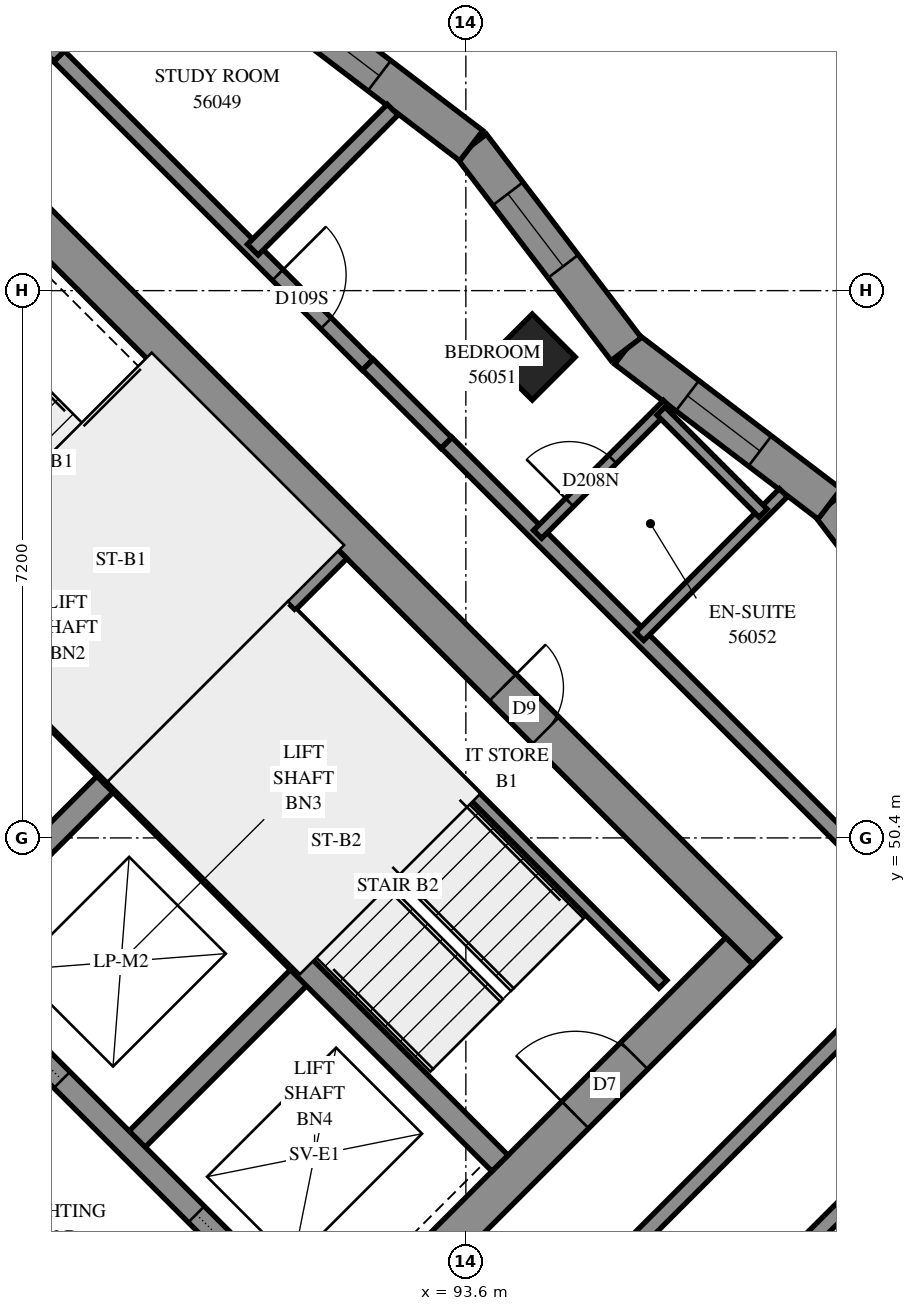
"""IFC4 building model, lengths in metres.
Left out: names, types, materials, properties, quantities, classifications, styles, units other than length and angle.
Written with IfcOpenShell. Run it as: python <this file> out.ifc"""

import sys

from ifc_helpers import new_model, si_unit, direction, frame, frame_2d, origin, origin_2d, place, context, subcontext, project, spatial, polyline, rectangle, outline, extrude, element, fill, save


model = new_model("IFC4")
c1 = context("Model", 3, precision=1e-05, world=origin(), true_north=direction((0.0, 1.0)))
c2 = subcontext(c1, "Body", "Model", "MODEL_VIEW")
j1 = project(units=[si_unit("LENGTHUNIT", "METRE"), si_unit("PLANEANGLEUNIT", "RADIAN")], contexts=[c1])
p1 = place(None, origin())
s1 = spatial("IfcSite", under=j1, at=p1, CompositionType="ELEMENT")
p2 = place(p1, origin())
s2 = spatial("IfcBuilding", under=s1, at=p2, CompositionType="ELEMENT")
p3 = place(p2, frame((0.0, 0.0, 206.6)))
s3 = spatial("IfcBuildingStorey", under=s2, at=p3, CompositionType="ELEMENT", Elevation=206.6)
p4 = place(p3, frame((94.474, 56.727, 0.0), z_axis=(0.0, 0.0, 1.0), x_axis=(0.7071067812, -0.7071067812, 0.0)))
e1 = element("IfcColumn", 1, at=p4, inside=s3, PredefinedType="COLUMN", context=c2, shape_type="SweptSolid", body=[
    extrude(rectangle(XDim=0.8, YDim=0.8, at=origin_2d()), origin(), (0.0, 0.0, 1.0), 3.1),
])
p5 = place(p3, frame((86.66, 59.802, -0.3), z_axis=(0.0, 0.0, 1.0), x_axis=(0.7071067812, -0.7071067812, 0.0)))
e2 = element("IfcWall", 2, at=p5, inside=s3, PredefinedType="SHEAR", context=c2, shape_type="SweptSolid", body=[
    extrude(rectangle(XDim=15.4, YDim=0.5, at=frame_2d((7.7, 0.0))), origin(), (0.0, 0.0, 1.0), 2.7),
])
p6 = place(p5, frame((10.5, 0.0, 0.3)))
e3 = element("IfcOpeningElement", 3, at=p6, cuts=e2, PredefinedType="OPENING", context=c2, shape_type="SweptSolid", body=[
    extrude(rectangle(XDim=0.8, YDim=2.1, at=frame_2d((0.4, 1.05))), frame((0.0, 0.26, 0.0), z_axis=(0.0, -1.0, 0.0), x_axis=(1.0, 0.0, 0.0)), (0.0, 0.0, 1.0), 0.52),
])
p7 = place(p3, frame((87.013, 38.731, -0.3), z_axis=(0.0, 0.0, 1.0), x_axis=(0.7071067812, 0.7071067812, 0.0)))
e4 = element("IfcWall", 4, at=p7, inside=s3, PredefinedType="SHEAR", context=c2, shape_type="SweptSolid", body=[
    extrude(rectangle(XDim=14.4, YDim=0.5, at=frame_2d((7.2, 0.0))), origin(), (0.0, 0.0, 1.0), 2.7),
])
p8 = place(p7, frame((4.55, 0.0, 0.3)))
e5 = element("IfcOpeningElement", 5, at=p8, cuts=e4, PredefinedType="OPENING", context=c2, shape_type="SweptSolid", body=[
    extrude(rectangle(XDim=1.1, YDim=2.1, at=frame_2d((0.55, 1.05))), frame((0.0, 0.26, 0.0), z_axis=(0.0, -1.0, 0.0), x_axis=(1.0, 0.0, 0.0)), (0.0, 0.0, 1.0), 0.52),
])
p9 = place(p7, frame((11.35, 0.0, 0.3)))
e6 = element("IfcOpeningElement", 6, at=p9, cuts=e4, PredefinedType="OPENING", context=c2, shape_type="SweptSolid", body=[
    extrude(rectangle(XDim=1.1, YDim=2.1, at=frame_2d((0.55, 1.05))), frame((0.0, 0.26, 0.0), z_axis=(0.0, -1.0, 0.0), x_axis=(1.0, 0.0, 0.0)), (0.0, 0.0, 1.0), 0.52),
])
for number, where, z_axis, x_axis in (
    (7, (86.625, 48.878, 0.0), (0.0, 0.0, 1.0), (0.707, 0.707, 0.0)),
    (8, (89.17, 46.332, 0.0), (0.0, 0.0, 1.0), (0.707, 0.707, 0.0)),
):
    element("IfcWall", number, at=place(p3, frame(where, z_axis=z_axis, x_axis=x_axis)), inside=s3, PredefinedType="SOLIDWALL", context=c2, shape_type="SweptSolid", body=[
        extrude(rectangle(XDim=3.3, YDim=0.3, at=frame_2d((1.65, 0.0))), origin(), (0.0, 0.0, 1.0), 3.1),
    ])
p10 = place(p3, frame((78.988, 51.423, 0.0), z_axis=(0.0, 0.0, 1.0), x_axis=(0.7071067812, -0.7071067812, 0.0)))
e9 = element("IfcWall", 9, at=p10, inside=s3, PredefinedType="SOLIDWALL", context=c2, shape_type="SweptSolid", body=[
    extrude(rectangle(XDim=14.4, YDim=0.3, at=frame_2d((7.2, 0.0))), origin(), (0.0, 0.0, 1.0), 3.1),
])
p11 = place(p10, frame((1.35, 0.0, 0.0)))
e10 = element("IfcOpeningElement", 10, at=p11, cuts=e9, PredefinedType="OPENING", context=c2, shape_type="SweptSolid", body=[
    extrude(rectangle(XDim=0.9, YDim=2.1, at=frame_2d((0.45, 1.05))), frame((0.0, 0.16, 0.0), z_axis=(0.0, -1.0, 0.0), x_axis=(1.0, 0.0, 0.0)), (0.0, 0.0, 1.0), 0.32),
])
p12 = place(p10, frame((4.95, 0.0, 0.0)))
e11 = element("IfcOpeningElement", 11, at=p12, cuts=e9, PredefinedType="OPENING", context=c2, shape_type="SweptSolid", body=[
    extrude(rectangle(XDim=0.9, YDim=2.1, at=frame_2d((0.45, 1.05))), frame((0.0, 0.16, 0.0), z_axis=(0.0, -1.0, 0.0), x_axis=(1.0, 0.0, 0.0)), (0.0, 0.0, 1.0), 0.32),
])
p13 = place(p10, frame((8.55, 0.0, 0.0)))
e12 = element("IfcOpeningElement", 12, at=p13, cuts=e9, PredefinedType="OPENING", context=c2, shape_type="SweptSolid", body=[
    extrude(rectangle(XDim=0.9, YDim=2.1, at=frame_2d((0.45, 1.05))), frame((0.0, 0.16, 0.0), z_axis=(0.0, -1.0, 0.0), x_axis=(1.0, 0.0, 0.0)), (0.0, 0.0, 1.0), 0.32),
])
p14 = place(p10, frame((12.05, 0.0, 0.0)))
e13 = element("IfcOpeningElement", 13, at=p14, cuts=e9, PredefinedType="OPENING", context=c2, shape_type="SweptSolid", body=[
    extrude(rectangle(XDim=1.1, YDim=2.1, at=frame_2d((0.55, 1.05))), frame((0.0, 0.16, 0.0), z_axis=(0.0, -1.0, 0.0), x_axis=(1.0, 0.0, 0.0)), (0.0, 0.0, 1.0), 0.32),
])
p15 = place(p3, frame((81.534, 53.969, 0.0), z_axis=(0.0, 0.0, 1.0), x_axis=(0.707103309, -0.7071102534, 0.0)))
e14 = element("IfcWall", 14, at=p15, inside=s3, PredefinedType="SOLIDWALL", context=c2, shape_type="SweptSolid", body=[
    extrude(rectangle(XDim=14.4, YDim=0.3, at=frame_2d((7.2, 0.0))), origin(), (0.0, 0.0, 1.0), 3.1),
])
p16 = place(p15, frame((1.25, 0.0, 0.0)))
e15 = element("IfcOpeningElement", 15, at=p16, cuts=e14, PredefinedType="OPENING", context=c2, shape_type="SweptSolid", body=[
    extrude(rectangle(XDim=1.1, YDim=2.1, at=frame_2d((0.55, 1.05))), frame((0.0, 0.16, 0.0), z_axis=(0.0, -1.0, 0.0), x_axis=(1.0, 0.0, 0.0)), (0.0, 0.0, 1.0), 0.32),
])
p17 = place(p15, frame((4.85, 0.0, 0.0)))
e16 = element("IfcOpeningElement", 16, at=p17, cuts=e14, PredefinedType="OPENING", context=c2, shape_type="SweptSolid", body=[
    extrude(rectangle(XDim=1.1, YDim=2.1, at=frame_2d((0.55, 1.05))), frame((0.0, 0.16, 0.0), z_axis=(0.0, -1.0, 0.0), x_axis=(1.0, 0.0, 0.0)), (0.0, 0.0, 1.0), 0.32),
])
p18 = place(p15, frame((8.45, 0.0, 0.0)))
e17 = element("IfcOpeningElement", 17, at=p18, cuts=e14, PredefinedType="OPENING", context=c2, shape_type="SweptSolid", body=[
    extrude(rectangle(XDim=1.1, YDim=2.1, at=frame_2d((0.55, 1.05))), frame((0.0, 0.16, 0.0), z_axis=(0.0, -1.0, 0.0), x_axis=(1.0, 0.0, 0.0)), (0.0, 0.0, 1.0), 0.32),
])
p19 = place(p15, frame((12.05, 0.0, 0.0)))
e18 = element("IfcOpeningElement", 18, at=p19, cuts=e14, PredefinedType="OPENING", context=c2, shape_type="SweptSolid", body=[
    extrude(rectangle(XDim=1.1, YDim=2.1, at=frame_2d((0.55, 1.05))), frame((0.0, 0.16, 0.0), z_axis=(0.0, -1.0, 0.0), x_axis=(1.0, 0.0, 0.0)), (0.0, 0.0, 1.0), 0.32),
])
for number, where, z_axis, x_axis in (
    (19, (83.867, 56.302, 0.0), (0.0, 0.0, 1.0), (0.707, -0.707, 0.0)),
    (20, (88.958, 51.211, 0.0), (0.0, 0.0, 1.0), (0.707, -0.707, 0.0)),
):
    element("IfcWall", number, at=place(p3, frame(where, z_axis=z_axis, x_axis=x_axis)), inside=s3, PredefinedType="SOLIDWALL", context=c2, shape_type="SweptSolid", body=[
        extrude(rectangle(XDim=7.2, YDim=0.3, at=frame_2d((3.6, 0.0))), origin(), (0.0, 0.0, 1.0), 3.1),
    ])
p20 = place(p3, frame((88.958, 51.211, 0.0), z_axis=(0.0, 0.0, 1.0), x_axis=(0.7071067812, 0.7071067812, 0.0)))
e21 = element("IfcWall", 21, at=p20, inside=s3, PredefinedType="SOLIDWALL", context=c2, shape_type="SweptSolid", body=[
    extrude(rectangle(XDim=4.2, YDim=0.3, at=frame_2d((2.1, 0.0))), origin(), (0.0, 0.0, 1.0), 3.1),
])
p21 = place(p3, frame((100.437, 52.099, 0.0), z_axis=(0.0, 0.0, 1.0), x_axis=(-0.6059097208, 0.7955334124, 0.0)))
e22 = element("IfcWall", 22, at=p21, inside=s3, PredefinedType="SOLIDWALL", context=c2, shape_type="SweptSolid", body=[
    extrude(outline(polyline([(0.056, -0.25), (3.42, -0.25), (3.352, 0.25), (-0.056, 0.25), (0.056, -0.25)])), origin(), (0.0, 0.0, 1.0), 3.1),
])
p22 = place(p21, frame((1.076, 0.0, 0.45)))
e23 = element("IfcOpeningElement", 23, at=p22, cuts=e22, PredefinedType="OPENING", context=c2, shape_type="SweptSolid", body=[
    extrude(rectangle(XDim=1.2, YDim=2.5, at=frame_2d((0.6, 1.25))), frame((0.0, 0.26, 0.0), z_axis=(0.0, -1.0, 0.0), x_axis=(1.0, 0.0, 0.0)), (0.0, 0.0, 1.0), 0.52),
])
p23 = place(p3, frame((98.385, 54.793, 0.0), z_axis=(0.0, 0.0, 1.0), x_axis=(-0.7955183856, 0.6059294498, 0.0)))
e24 = element("IfcWall", 24, at=p23, inside=s3, PredefinedType="SOLIDWALL", context=c2, shape_type="SweptSolid", body=[
    extrude(outline(polyline([(-0.034, -0.25), (3.33, -0.25), (3.397, 0.25), (0.034, 0.25), (-0.034, -0.25)])), origin(), (0.0, 0.0, 1.0), 3.1),
])
p24 = place(p23, frame((1.151, 0.0, 0.45)))
e25 = element("IfcOpeningElement", 25, at=p24, cuts=e24, PredefinedType="OPENING", context=c2, shape_type="SweptSolid", body=[
    extrude(rectangle(XDim=1.2, YDim=2.5, at=frame_2d((0.6, 1.25))), frame((0.0, 0.26, 0.0), z_axis=(0.0, -1.0, 0.0), x_axis=(1.0, 0.0, 0.0)), (0.0, 0.0, 1.0), 0.52),
])
p25 = place(p3, frame((95.71, 56.831, 0.0), z_axis=(0.0, 0.0, 1.0), x_axis=(-0.6059294498, 0.7955183856, 0.0)))
e26 = element("IfcWall", 26, at=p25, inside=s3, PredefinedType="SOLIDWALL", context=c2, shape_type="SweptSolid", body=[
    extrude(outline(polyline([(0.034, -0.25), (3.397, -0.25), (3.33, 0.25), (-0.034, 0.25), (0.034, -0.25)])), origin(), (0.0, 0.0, 1.0), 3.1),
])
p26 = place(p25, frame((1.369, 0.0, 0.45)))
e27 = element("IfcOpeningElement", 27, at=p26, cuts=e26, PredefinedType="OPENING", context=c2, shape_type="SweptSolid", body=[
    extrude(rectangle(XDim=1.2, YDim=2.5, at=frame_2d((0.6, 1.25))), frame((0.0, 0.26, 0.0), z_axis=(0.0, -1.0, 0.0), x_axis=(1.0, 0.0, 0.0)), (0.0, 0.0, 1.0), 0.52),
])
p27 = place(p3, frame((93.671, 59.507, 0.0), z_axis=(0.0, 0.0, 1.0), x_axis=(-0.7955293007, 0.6059151193, 0.0)))
e28 = element("IfcWall", 28, at=p27, inside=s3, PredefinedType="SOLIDWALL", context=c2, shape_type="SweptSolid", body=[
    extrude(outline(polyline([(-0.034, -0.25), (3.33, -0.25), (3.397, 0.25), (0.034, 0.25), (-0.034, -0.25)])), origin(), (0.0, 0.0, 1.0), 3.1),
])
p28 = place(p27, frame((1.52, 0.0, 0.45)))
e29 = element("IfcOpeningElement", 29, at=p28, cuts=e28, PredefinedType="OPENING", context=c2, shape_type="SweptSolid", body=[
    extrude(rectangle(XDim=1.2, YDim=2.5, at=frame_2d((0.6, 1.25))), frame((0.0, 0.26, 0.0), z_axis=(0.0, -1.0, 0.0), x_axis=(1.0, 0.0, 0.0)), (0.0, 0.0, 1.0), 0.52),
])
p29 = place(p3, frame((91.313, 53.354, 0.0), z_axis=(0.0, 0.0, 1.0), x_axis=(0.7071140275, -0.7070995348, 0.0)))
e30 = element("IfcWall", 30, at=p29, inside=s3, PredefinedType="PARTITIONING", context=c2, shape_type="SweptSolid", body=[
    extrude(rectangle(XDim=6.9, YDim=0.15, at=frame_2d((3.45, 0.0))), origin(), (0.0, 0.0, 1.0), 3.1),
])
p30 = place(p3, frame((93.346, 55.599, 0.0), z_axis=(0.0, 0.0, 1.0), x_axis=(0.7071067812, -0.7071067812, 0.0)))
e31 = element("IfcWall", 31, at=p30, inside=s3, PredefinedType="PARTITIONING", context=c2, shape_type="SweptSolid", body=[
    extrude(rectangle(XDim=9.201, YDim=0.2, at=frame_2d((4.601, 0.0))), origin(), (0.0, 0.0, 1.0), 3.1),
])
p31 = place(p3, frame((94.049, 43.293, 0.0), z_axis=(0.0, 0.0, 1.0), x_axis=(0.7071067812, 0.7071067812, 0.0)))
e32 = element("IfcWall", 32, at=p31, inside=s3, PredefinedType="PARTITIONING", context=c2, shape_type="SweptSolid", body=[
    extrude(rectangle(XDim=8.2, YDim=0.2, at=frame_2d((4.1, 0.0))), origin(), (0.0, 0.0, 1.0), 3.1),
])
p32 = place(p31, frame((0.252, 0.0, 0.0)))
e33 = element("IfcOpeningElement", 33, at=p32, cuts=e32, PredefinedType="OPENING", context=c2, shape_type="SweptSolid", body=[
    extrude(rectangle(XDim=1.0, YDim=2.1, at=frame_2d((0.5, 1.05))), frame((0.0, 0.11, 0.0), z_axis=(0.0, -1.0, 0.0), x_axis=(1.0, 0.0, 0.0)), (0.0, 0.0, 1.0), 0.22),
])
p33 = place(p3, frame((88.247, 60.683, 0.0), z_axis=(0.0, 0.0, 1.0), x_axis=(0.7071067812, -0.7071067812, 0.0)))
e34 = element("IfcWall", 34, at=p33, inside=s3, PredefinedType="PARTITIONING", context=c2, shape_type="SweptSolid", body=[
    extrude(rectangle(XDim=5.742, YDim=0.2, at=frame_2d((2.871, 0.0))), origin(), (0.0, 0.0, 1.0), 3.1),
])
p34 = place(p33, frame((4.069, 0.0, 0.0)))
e35 = element("IfcOpeningElement", 35, at=p34, cuts=e34, PredefinedType="OPENING", context=c2, shape_type="SweptSolid", body=[
    extrude(rectangle(XDim=0.9, YDim=2.1, at=frame_2d((0.45, 1.05))), frame((0.0, 0.11, 0.0), z_axis=(0.0, -1.0, 0.0), x_axis=(1.0, 0.0, 0.0)), (0.0, 0.0, 1.0), 0.22),
])
p35 = place(p3, frame((96.88, 43.856, 0.0), z_axis=(0.0, 0.0, 1.0), x_axis=(0.7074098182, 0.7068036142, 0.0)))
e36 = element("IfcWall", 36, at=p35, inside=s3, PredefinedType="PARTITIONING", context=c2, shape_type="SweptSolid", body=[
    extrude(rectangle(XDim=3.299, YDim=0.2, at=frame_2d((1.65, 0.0))), origin(), (0.0, 0.0, 1.0), 3.1),
])
p36 = place(p3, frame((95.887, 53.051, 0.0), z_axis=(0.0, 0.0, 1.0), x_axis=(0.7070880799, 0.707125482, 0.0)))
e37 = element("IfcWall", 37, at=p36, inside=s3, PredefinedType="PARTITIONING", context=c2, shape_type="SweptSolid", body=[
    extrude(rectangle(XDim=2.674, YDim=0.15, at=frame_2d((1.337, 0.0))), origin(), (0.0, 0.0, 1.0), 3.1),
])
p37 = place(p3, frame((90.797, 58.139, 0.0), z_axis=(0.0, 0.0, 1.0), x_axis=(0.7066456247, 0.7075676371, 0.0)))
e38 = element("IfcWall", 38, at=p37, inside=s3, PredefinedType="PARTITIONING", context=c2, shape_type="SweptSolid", body=[
    extrude(rectangle(XDim=2.603, YDim=0.2, at=frame_2d((1.302, 0.0))), origin(), (0.0, 0.0, 1.0), 3.1),
])
p38 = place(p3, frame((94.544, 54.394, 0.0), z_axis=(0.0, 0.0, 1.0), x_axis=(0.7070860901, 0.7071274716, 0.0)))
e39 = element("IfcWall", 39, at=p38, inside=s3, PredefinedType="PARTITIONING", context=c2, shape_type="SweptSolid", body=[
    extrude(rectangle(XDim=2.417, YDim=0.15, at=frame_2d((1.208, 0.0))), origin(), (0.0, 0.0, 1.0), 3.1),
])
p39 = place(p38, frame((0.594, 0.0, 0.0)))
e40 = element("IfcOpeningElement", 40, at=p39, cuts=e39, PredefinedType="OPENING", context=c2, shape_type="SweptSolid", body=[
    extrude(rectangle(XDim=0.8, YDim=2.1, at=frame_2d((0.4, 1.05))), frame((0.0, 0.085, 0.0), z_axis=(0.0, -1.0, 0.0), x_axis=(1.0, 0.0, 0.0)), (0.0, 0.0, 1.0), 0.17),
])
p40 = place(p3, frame((96.167, 56.017, 0.0), z_axis=(0.0, 0.0, 1.0), x_axis=(0.7071067812, -0.7071067812, 0.0)))
e41 = element("IfcWall", 41, at=p40, inside=s3, PredefinedType="PARTITIONING", context=c2, shape_type="SweptSolid", body=[
    extrude(rectangle(XDim=1.901, YDim=0.15, at=frame_2d((0.95, 0.0))), origin(), (0.0, 0.0, 1.0), 3.1),
])
p41 = place(p3, frame((92.311, 56.627, 0.0), z_axis=(0.0, 0.0, 1.0), x_axis=(0.7077922938, -0.7064206033, 0.0)))
e42 = element("IfcWall", 42, at=p41, inside=s3, PredefinedType="PARTITIONING", context=c2, shape_type="SweptSolid", body=[
    extrude(rectangle(XDim=1.458, YDim=0.2, at=frame_2d((0.729, 0.0))), origin(), (0.0, 0.0, 1.0), 3.1),
])
p42 = place(p3, frame((87.899, 61.041, 0.0), z_axis=(0.0, 0.0, 1.0), x_axis=(0.7051008166, -0.7091070712, 0.0)))
e43 = element("IfcWall", 43, at=p42, inside=s3, PredefinedType="PARTITIONING", context=c2, shape_type="SweptSolid", body=[
    extrude(rectangle(XDim=0.499, YDim=0.2, at=frame_2d((0.25, 0.0))), origin(), (0.0, 0.0, 1.0), 3.1),
])
p43 = place(p24, origin())
e44 = element("IfcWindow", 44, at=p43, inside=s3, PartitioningType="SINGLE_PANEL", PredefinedType="WINDOW", context=c2, shape_type="SweptSolid", body=[
    extrude(rectangle(XDim=1.2, YDim=2.5, at=frame_2d((0.6, 1.25))), frame((0.0, 0.18, 0.0), z_axis=(0.0, -1.0, 0.0), x_axis=(1.0, 0.0, 0.0)), (0.0, 0.0, 1.0), 0.06),
])
fill(e25, e44)
p44 = place(p26, origin())
e45 = element("IfcWindow", 45, at=p44, inside=s3, PartitioningType="SINGLE_PANEL", PredefinedType="WINDOW", context=c2, shape_type="SweptSolid", body=[
    extrude(rectangle(XDim=1.2, YDim=2.5, at=frame_2d((0.6, 1.25))), frame((0.0, 0.18, 0.0), z_axis=(0.0, -1.0, 0.0), x_axis=(1.0, 0.0, 0.0)), (0.0, 0.0, 1.0), 0.06),
])
fill(e27, e45)
p45 = place(p28, origin())
e46 = element("IfcWindow", 46, at=p45, inside=s3, PartitioningType="SINGLE_PANEL", PredefinedType="WINDOW", context=c2, shape_type="SweptSolid", body=[
    extrude(rectangle(XDim=1.2, YDim=2.5, at=frame_2d((0.6, 1.25))), frame((0.0, 0.18, 0.0), z_axis=(0.0, -1.0, 0.0), x_axis=(1.0, 0.0, 0.0)), (0.0, 0.0, 1.0), 0.06),
])
fill(e29, e46)
p46 = place(p6, origin())
e47 = element("IfcDoor", 47, at=p46, inside=s3, OperationType="SINGLE_SWING_RIGHT", PredefinedType="DOOR", context=c2, shape_type="SweptSolid", body=[
    extrude(rectangle(XDim=0.8, YDim=2.1, at=frame_2d((0.4, 1.05))), frame((0.0, 0.025, 0.0), z_axis=(0.0, -1.0, 0.0), x_axis=(1.0, 0.0, 0.0)), (0.0, 0.0, 1.0), 0.05),
])
fill(e3, e47)
p47 = place(p9, origin())
e48 = element("IfcDoor", 48, at=p47, inside=s3, OperationType="SINGLE_SWING_RIGHT", PredefinedType="DOOR", context=c2, shape_type="SweptSolid", body=[
    extrude(rectangle(XDim=1.1, YDim=2.1, at=frame_2d((0.55, 1.05))), frame((0.0, 0.025, 0.0), z_axis=(0.0, -1.0, 0.0), x_axis=(1.0, 0.0, 0.0)), (0.0, 0.0, 1.0), 0.05),
])
fill(e6, e48)
p48 = place(p18, origin())
e49 = element("IfcDoor", 49, at=p48, inside=s3, OperationType="SLIDING_TO_LEFT", PredefinedType="DOOR", context=c2, shape_type="SweptSolid", body=[
    extrude(rectangle(XDim=1.1, YDim=2.1, at=frame_2d((0.55, 1.05))), frame((0.0, 0.025, 0.0), z_axis=(0.0, -1.0, 0.0), x_axis=(1.0, 0.0, 0.0)), (0.0, 0.0, 1.0), 0.05),
])
fill(e17, e49)
p49 = place(p19, origin())
e50 = element("IfcDoor", 50, at=p49, inside=s3, OperationType="SLIDING_TO_RIGHT", PredefinedType="DOOR", context=c2, shape_type="SweptSolid", body=[
    extrude(rectangle(XDim=1.1, YDim=2.1, at=frame_2d((0.55, 1.05))), frame((0.0, 0.025, 0.0), z_axis=(0.0, -1.0, 0.0), x_axis=(1.0, 0.0, 0.0)), (0.0, 0.0, 1.0), 0.05),
])
fill(e18, e50)
p50 = place(p34, origin())
e51 = element("IfcDoor", 51, at=p50, inside=s3, OperationType="SINGLE_SWING_RIGHT", PredefinedType="DOOR", context=c2, shape_type="SweptSolid", body=[
    extrude(rectangle(XDim=0.9, YDim=2.1, at=frame_2d((0.45, 1.05))), frame((0.0, 0.025, 0.0), z_axis=(0.0, -1.0, 0.0), x_axis=(1.0, 0.0, 0.0)), (0.0, 0.0, 1.0), 0.05),
])
fill(e35, e51)
p51 = place(p39, origin())
e52 = element("IfcDoor", 52, at=p51, inside=s3, OperationType="SINGLE_SWING_RIGHT", PredefinedType="DOOR", context=c2, shape_type="SweptSolid", body=[
    extrude(rectangle(XDim=0.8, YDim=2.1, at=frame_2d((0.4, 1.05))), frame((0.0, 0.025, 0.0), z_axis=(0.0, -1.0, 0.0), x_axis=(1.0, 0.0, 0.0)), (0.0, 0.0, 1.0), 0.05),
])
fill(e40, e52)
save(model, sys.argv[1])
